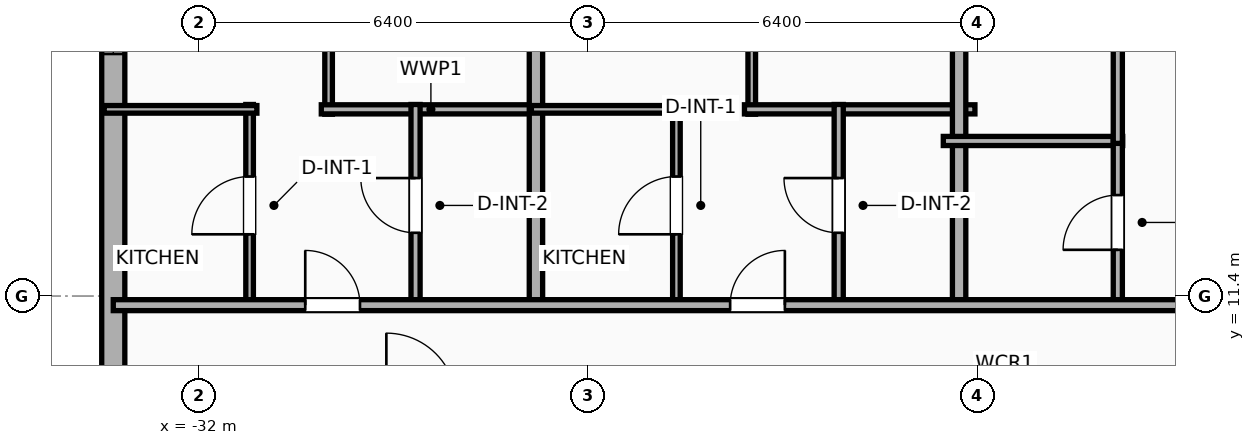
"""IFC4 building model, lengths in metres.
Left out: names, types, materials, properties, quantities, classifications, styles, units other than length and angle.
Written with IfcOpenShell. Run it as: python <this file> out.ifc"""

import sys

from ifc_helpers import new_model, si_unit, direction, frame, frame_2d, origin, place, context, subcontext, project, spatial, rectangle, extrude, element, fill, save


model = new_model("IFC4")
c1 = context("Model", 3, precision=1e-05, world=origin(), true_north=direction((0.0, 1.0)))
c2 = subcontext(c1, "Body", "Model", "MODEL_VIEW")
j1 = project(units=[si_unit("LENGTHUNIT", "METRE"), si_unit("PLANEANGLEUNIT", "RADIAN")], contexts=[c1])
p1 = place(None, origin())
s1 = spatial("IfcSite", under=j1, at=p1, CompositionType="ELEMENT")
p2 = place(p1, origin())
s2 = spatial("IfcBuilding", under=s1, at=p2, CompositionType="ELEMENT")
p3 = place(p2, frame((0.0, 0.0, 76.7)))
s3 = spatial("IfcBuildingStorey", under=s2, at=p3, CompositionType="ELEMENT", Elevation=76.7)
p4 = place(p3, frame((-33.41, -18.381, 0.0), z_axis=(0.0, 0.0, 1.0), x_axis=(0.0, 1.0, 0.0)))
e1 = element("IfcWall", 1, at=p4, inside=s3, PredefinedType="ELEMENTEDWALL", context=c2, shape_type="SweptSolid", body=[
    extrude(rectangle(XDim=36.763, YDim=0.38, at=frame_2d((18.381, 0.0))), origin(), (0.0, 0.0, 1.0), 3.6),
])
p5 = place(p4, frame((33.762, 0.0, 0.75)))
e2 = element("IfcOpeningElement", 2, at=p5, cuts=e1, PredefinedType="OPENING", context=c2, shape_type="SweptSolid", body=[
    extrude(rectangle(XDim=1.2, YDim=2.05, at=frame_2d((0.6, 1.025))), frame((0.0, 0.2, 0.0), z_axis=(0.0, -1.0, 0.0), x_axis=(1.0, 0.0, 0.0)), (0.0, 0.0, 1.0), 0.4),
])
p6 = place(p4, frame((22.701, 0.0, 0.75)))
e3 = element("IfcOpeningElement", 3, at=p6, cuts=e1, PredefinedType="OPENING", context=c2, shape_type="SweptSolid", body=[
    extrude(rectangle(XDim=1.2, YDim=2.05, at=frame_2d((0.6, 1.025))), frame((0.0, 0.2, 0.0), z_axis=(0.0, -1.0, 0.0), x_axis=(1.0, 0.0, 0.0)), (0.0, 0.0, 1.0), 0.4),
])
p7 = place(p4, frame((13.001, 0.0, 0.75)))
e4 = element("IfcOpeningElement", 4, at=p7, cuts=e1, PredefinedType="OPENING", context=c2, shape_type="SweptSolid", body=[
    extrude(rectangle(XDim=1.2, YDim=2.05, at=frame_2d((0.6, 1.025))), frame((0.0, 0.2, 0.0), z_axis=(0.0, -1.0, 0.0), x_axis=(1.0, 0.0, 0.0)), (0.0, 0.0, 1.0), 0.4),
])
p8 = place(p3, frame((-29.869, 14.39, 0.0), z_axis=(0.0, 0.0, 1.0), x_axis=(0.0, 1.0, 0.0)))
e5 = element("IfcWall", 5, at=p8, inside=s3, PredefinedType="PARTITIONING", context=c2, shape_type="SweptSolid", body=[
    extrude(rectangle(XDim=7.916, YDim=0.125, at=frame_2d((3.958, 0.0))), origin(), (0.0, 0.0, 1.0), 3.6),
])
p9 = place(p8, frame((1.45, 0.0, 0.0)))
e6 = element("IfcOpeningElement", 6, at=p9, cuts=e5, PredefinedType="OPENING", context=c2, shape_type="SweptSolid", body=[
    extrude(rectangle(XDim=0.9, YDim=2.05, at=frame_2d((0.45, 1.025))), frame((0.0, 0.073, 0.0), z_axis=(0.0, -1.0, 0.0), x_axis=(1.0, 0.0, 0.0)), (0.0, 0.0, 1.0), 0.145),
])
p10 = place(p3, frame((-29.989, 14.47, 0.0), z_axis=(0.0, 0.0, 1.0), x_axis=(1.0, 0.0, 0.0)))
e7 = element("IfcWall", 7, at=p10, inside=s3, PredefinedType="PLUMBINGWALL", context=c2, shape_type="SweptSolid", body=[
    extrude(rectangle(XDim=3.605, YDim=0.15, at=frame_2d((1.802, 0.0))), origin(), (0.0, 0.0, 1.0), 3.6),
])
p11 = place(p3, frame((-31.168, 11.23, 0.0), z_axis=(0.0, 0.0, 1.0), x_axis=(0.0, 1.0, 0.0)))
e8 = element("IfcWall", 8, at=p11, inside=s3, PredefinedType="PARTITIONING", context=c2, shape_type="SweptSolid", body=[
    extrude(rectangle(XDim=3.32, YDim=0.125, at=frame_2d((1.66, 0.0))), origin(), (0.0, 0.0, 1.0), 3.6),
])
p12 = place(p11, frame((1.185, 0.0, 0.0)))
e9 = element("IfcOpeningElement", 9, at=p12, cuts=e8, PredefinedType="OPENING", context=c2, shape_type="SweptSolid", body=[
    extrude(rectangle(XDim=0.95, YDim=2.05, at=frame_2d((0.475, 1.025))), frame((0.0, 0.073, 0.0), z_axis=(0.0, -1.0, 0.0), x_axis=(1.0, 0.0, 0.0)), (0.0, 0.0, 1.0), 0.145),
])
p13 = place(p3, frame((-33.56, 14.47, 0.0), z_axis=(0.0, 0.0, 1.0), x_axis=(1.0, 0.0, 0.0)))
e10 = element("IfcWall", 10, at=p13, inside=s3, PredefinedType="PARTITIONING", context=c2, shape_type="SweptSolid", body=[
    extrude(rectangle(XDim=2.512, YDim=0.125, at=frame_2d((1.256, 0.0))), origin(), (0.0, 0.0, 1.0), 3.6),
])
p14 = place(p3, frame((-28.439, 11.23, 0.0), z_axis=(0.0, 0.0, 1.0), x_axis=(0.0, 1.0, 0.0)))
e11 = element("IfcWall", 11, at=p14, inside=s3, PredefinedType="PLUMBINGWALL", context=c2, shape_type="SweptSolid", body=[
    extrude(rectangle(XDim=3.32, YDim=0.15, at=frame_2d((1.66, 0.0))), origin(), (0.0, 0.0, 1.0), 3.6),
])
p15 = place(p14, frame((1.21, 0.0, 0.0)))
e12 = element("IfcOpeningElement", 12, at=p15, cuts=e11, PredefinedType="OPENING", context=c2, shape_type="SweptSolid", body=[
    extrude(rectangle(XDim=0.9, YDim=2.05, at=frame_2d((0.45, 1.025))), frame((0.0, 0.085, 0.0), z_axis=(0.0, -1.0, 0.0), x_axis=(1.0, 0.0, 0.0)), (0.0, 0.0, 1.0), 0.17),
])
p16 = place(p3, frame((-26.459, 11.17, 0.0), z_axis=(0.0, 0.0, 1.0), x_axis=(0.0, 1.0, 0.0)))
e13 = element("IfcWall", 13, at=p16, inside=s3, PredefinedType="PARTITIONING", context=c2, shape_type="SweptSolid", body=[
    extrude(rectangle(XDim=11.04, YDim=0.22, at=frame_2d((5.52, 0.0))), origin(), (0.0, 0.0, 1.0), 3.6),
])
p17 = place(p3, frame((-22.91, 14.39, 0.0), z_axis=(0.0, 0.0, 1.0), x_axis=(0.0, 1.0, 0.0)))
e14 = element("IfcWall", 14, at=p17, inside=s3, PredefinedType="PARTITIONING", context=c2, shape_type="SweptSolid", body=[
    extrude(rectangle(XDim=7.97, YDim=0.125, at=frame_2d((3.985, 0.0))), origin(), (0.0, 0.0, 1.0), 3.6),
])
p18 = place(p17, frame((1.463, 0.0, 0.0)))
e15 = element("IfcOpeningElement", 15, at=p18, cuts=e14, PredefinedType="OPENING", context=c2, shape_type="SweptSolid", body=[
    extrude(rectangle(XDim=0.9, YDim=2.05, at=frame_2d((0.45, 1.025))), frame((0.0, 0.073, 0.0), z_axis=(0.0, -1.0, 0.0), x_axis=(1.0, 0.0, 0.0)), (0.0, 0.0, 1.0), 0.145),
])
p19 = place(p3, frame((-23.03, 14.47, 0.0), z_axis=(0.0, 0.0, 1.0), x_axis=(1.0, 0.0, 0.0)))
e16 = element("IfcWall", 16, at=p19, inside=s3, PredefinedType="PLUMBINGWALL", context=c2, shape_type="SweptSolid", body=[
    extrude(rectangle(XDim=3.79, YDim=0.15, at=frame_2d((1.895, 0.0))), origin(), (0.0, 0.0, 1.0), 3.6),
])
p20 = place(p3, frame((-24.149, 11.23, 0.0), z_axis=(0.0, 0.0, 1.0), x_axis=(0.0, 1.0, 0.0)))
e17 = element("IfcWall", 17, at=p20, inside=s3, PredefinedType="PARTITIONING", context=c2, shape_type="SweptSolid", body=[
    extrude(rectangle(XDim=3.32, YDim=0.125, at=frame_2d((1.66, 0.0))), origin(), (0.0, 0.0, 1.0), 3.6),
])
p21 = place(p20, frame((1.185, 0.0, 0.0)))
e18 = element("IfcOpeningElement", 18, at=p21, cuts=e17, PredefinedType="OPENING", context=c2, shape_type="SweptSolid", body=[
    extrude(rectangle(XDim=0.95, YDim=2.05, at=frame_2d((0.475, 1.025))), frame((0.0, 0.073, 0.0), z_axis=(0.0, -1.0, 0.0), x_axis=(1.0, 0.0, 0.0)), (0.0, 0.0, 1.0), 0.145),
])
p22 = place(p3, frame((-26.534, 14.47, 0.0), z_axis=(0.0, 0.0, 1.0), x_axis=(1.0, 0.0, 0.0)))
e19 = element("IfcWall", 19, at=p22, inside=s3, PredefinedType="PARTITIONING", context=c2, shape_type="SweptSolid", body=[
    extrude(rectangle(XDim=2.505, YDim=0.125, at=frame_2d((1.252, 0.0))), origin(), (0.0, 0.0, 1.0), 3.6),
])
p23 = place(p3, frame((-21.48, 11.23, 0.0), z_axis=(0.0, 0.0, 1.0), x_axis=(0.0, 1.0, 0.0)))
e20 = element("IfcWall", 20, at=p23, inside=s3, PredefinedType="PLUMBINGWALL", context=c2, shape_type="SweptSolid", body=[
    extrude(rectangle(XDim=3.32, YDim=0.15, at=frame_2d((1.66, 0.0))), origin(), (0.0, 0.0, 1.0), 3.6),
])
p24 = place(p23, frame((1.21, 0.0, 0.0)))
e21 = element("IfcOpeningElement", 21, at=p24, cuts=e20, PredefinedType="OPENING", context=c2, shape_type="SweptSolid", body=[
    extrude(rectangle(XDim=0.9, YDim=2.05, at=frame_2d((0.45, 1.025))), frame((0.0, 0.085, 0.0), z_axis=(0.0, -1.0, 0.0), x_axis=(1.0, 0.0, 0.0)), (0.0, 0.0, 1.0), 0.17),
])
p25 = place(p3, frame((-19.5, 11.17, 0.0), z_axis=(0.0, 0.0, 1.0), x_axis=(0.0, 1.0, 0.0)))
e22 = element("IfcWall", 22, at=p25, inside=s3, PredefinedType="PARTITIONING", context=c2, shape_type="SweptSolid", body=[
    extrude(rectangle(XDim=11.04, YDim=0.22, at=frame_2d((5.52, 0.0))), origin(), (0.0, 0.0, 1.0), 2.89),
])
p26 = place(p3, frame((-19.76, 13.95, 0.0), z_axis=(0.0, 0.0, 1.0), x_axis=(1.0, 0.0, 0.0)))
e23 = element("IfcWall", 23, at=p26, inside=s3, PredefinedType="PLUMBINGWALL", context=c2, shape_type="SweptSolid", body=[
    extrude(rectangle(XDim=2.95, YDim=0.15, at=frame_2d((1.475, 0.0))), origin(), (0.0, 0.0, 1.0), 3.6),
])
p27 = place(p3, frame((-16.89, 11.23, 0.0), z_axis=(0.0, 0.0, 1.0), x_axis=(0.0, 1.0, 0.0)))
e24 = element("IfcWall", 24, at=p27, inside=s3, PredefinedType="PLUMBINGWALL", context=c2, shape_type="SweptSolid", body=[
    extrude(rectangle(XDim=2.76, YDim=0.15, at=frame_2d((1.38, 0.0))), origin(), (0.0, 0.0, 1.0), 3.6),
])
p28 = place(p27, frame((0.93, 0.0, 0.0)))
e25 = element("IfcOpeningElement", 25, at=p28, cuts=e24, PredefinedType="OPENING", context=c2, shape_type="SweptSolid", body=[
    extrude(rectangle(XDim=0.9, YDim=2.05, at=frame_2d((0.45, 1.025))), frame((0.0, 0.085, 0.0), z_axis=(0.0, -1.0, 0.0), x_axis=(1.0, 0.0, 0.0)), (0.0, 0.0, 1.0), 0.17),
])
p29 = place(p3, frame((-16.89, 13.91, 0.0), z_axis=(0.0, 0.0, 1.0), x_axis=(0.0, 1.0, 0.0)))
e26 = element("IfcWall", 26, at=p29, inside=s3, PredefinedType="PLUMBINGWALL", context=c2, shape_type="SweptSolid", body=[
    extrude(rectangle(XDim=8.348, YDim=0.15, at=frame_2d((4.174, 0.0))), origin(), (0.0, 0.0, 1.0), 3.6),
])
p30 = place(p29, frame((3.724, 0.0, 0.0)))
e27 = element("IfcOpeningElement", 27, at=p30, cuts=e26, PredefinedType="OPENING", context=c2, shape_type="SweptSolid", body=[
    extrude(rectangle(XDim=0.9, YDim=2.05, at=frame_2d((0.45, 1.025))), frame((0.0, 0.085, 0.0), z_axis=(0.0, -1.0, 0.0), x_axis=(1.0, 0.0, 0.0)), (0.0, 0.0, 1.0), 0.17),
])
p31 = place(p3, frame((-33.41, 11.25, 0.0), z_axis=(0.0, 0.0, 1.0), x_axis=(1.0, 0.0, 0.0)))
e28 = element("IfcWall", 28, at=p31, inside=s3, PredefinedType="PARTITIONING", context=c2, shape_type="SweptSolid", body=[
    extrude(rectangle(XDim=59.62, YDim=0.18, at=frame_2d((29.81, 0.0))), origin(), (0.0, 0.0, 1.0), 3.6),
])
p32 = place(p31, frame((3.157, 0.0, 0.0)))
e29 = element("IfcOpeningElement", 29, at=p32, cuts=e28, PredefinedType="OPENING", context=c2, shape_type="SweptSolid", body=[
    extrude(rectangle(XDim=0.9, YDim=2.05, at=frame_2d((0.45, 1.025))), frame((0.0, 0.1, 0.0), z_axis=(0.0, -1.0, 0.0), x_axis=(1.0, 0.0, 0.0)), (0.0, 0.0, 1.0), 0.2),
])
p33 = place(p31, frame((10.145, 0.0, 0.0)))
e30 = element("IfcOpeningElement", 30, at=p33, cuts=e28, PredefinedType="OPENING", context=c2, shape_type="SweptSolid", body=[
    extrude(rectangle(XDim=0.9, YDim=2.05, at=frame_2d((0.45, 1.025))), frame((0.0, 0.1, 0.0), z_axis=(0.0, -1.0, 0.0), x_axis=(1.0, 0.0, 0.0)), (0.0, 0.0, 1.0), 0.2),
])
p34 = place(p31, frame((17.86, 0.0, 0.0)))
e31 = element("IfcOpeningElement", 31, at=p34, cuts=e28, PredefinedType="OPENING", context=c2, shape_type="SweptSolid", body=[
    extrude(rectangle(XDim=1.15, YDim=2.05, at=frame_2d((0.575, 1.025))), frame((0.0, 0.1, 0.0), z_axis=(0.0, -1.0, 0.0), x_axis=(1.0, 0.0, 0.0)), (0.0, 0.0, 1.0), 0.2),
])
p35 = place(p31, frame((23.338, 0.0, 0.0)))
e32 = element("IfcOpeningElement", 32, at=p35, cuts=e28, PredefinedType="OPENING", context=c2, shape_type="SweptSolid", body=[
    extrude(rectangle(XDim=0.9, YDim=2.05, at=frame_2d((0.45, 1.025))), frame((0.0, 0.1, 0.0), z_axis=(0.0, -1.0, 0.0), x_axis=(1.0, 0.0, 0.0)), (0.0, 0.0, 1.0), 0.2),
])
p36 = place(p31, frame((30.719, 0.0, 0.0)))
e33 = element("IfcOpeningElement", 33, at=p36, cuts=e28, PredefinedType="OPENING", context=c2, shape_type="SweptSolid", body=[
    extrude(rectangle(XDim=1.15, YDim=2.05, at=frame_2d((0.575, 1.025))), frame((0.0, 0.1, 0.0), z_axis=(0.0, -1.0, 0.0), x_axis=(1.0, 0.0, 0.0)), (0.0, 0.0, 1.0), 0.2),
])
p37 = place(p31, frame((34.81, 0.0, 0.0)))
e34 = element("IfcOpeningElement", 34, at=p37, cuts=e28, PredefinedType="OPENING", context=c2, shape_type="SweptSolid", body=[
    extrude(rectangle(XDim=1.15, YDim=2.05, at=frame_2d((0.575, 1.025))), frame((0.0, 0.1, 0.0), z_axis=(0.0, -1.0, 0.0), x_axis=(1.0, 0.0, 0.0)), (0.0, 0.0, 1.0), 0.2),
])
p38 = place(p31, frame((42.912, 0.0, 0.0)))
e35 = element("IfcOpeningElement", 35, at=p38, cuts=e28, PredefinedType="OPENING", context=c2, shape_type="SweptSolid", body=[
    extrude(rectangle(XDim=0.9, YDim=2.05, at=frame_2d((0.45, 1.025))), frame((0.0, 0.1, 0.0), z_axis=(0.0, -1.0, 0.0), x_axis=(1.0, 0.0, 0.0)), (0.0, 0.0, 1.0), 0.2),
])
p39 = place(p31, frame((49.482, 0.0, 0.0)))
e36 = element("IfcOpeningElement", 36, at=p39, cuts=e28, PredefinedType="OPENING", context=c2, shape_type="SweptSolid", body=[
    extrude(rectangle(XDim=0.9, YDim=2.05, at=frame_2d((0.45, 1.025))), frame((0.0, 0.1, 0.0), z_axis=(0.0, -1.0, 0.0), x_axis=(1.0, 0.0, 0.0)), (0.0, 0.0, 1.0), 0.2),
])
p40 = place(p31, frame((56.088, 0.0, 0.0)))
e37 = element("IfcOpeningElement", 37, at=p40, cuts=e28, PredefinedType="OPENING", context=c2, shape_type="SweptSolid", body=[
    extrude(rectangle(XDim=0.9, YDim=2.05, at=frame_2d((0.45, 1.025))), frame((0.0, 0.1, 0.0), z_axis=(0.0, -1.0, 0.0), x_axis=(1.0, 0.0, 0.0)), (0.0, 0.0, 1.0), 0.2),
])
p41 = place(p5, origin())
e38 = element("IfcWindow", 38, at=p41, inside=s3, PartitioningType="SINGLE_PANEL", PredefinedType="WINDOW", context=c2, shape_type="SweptSolid", body=[
    extrude(rectangle(XDim=1.2, YDim=2.05, at=frame_2d((0.6, 1.025))), frame((0.0, 0.03, 0.0), z_axis=(0.0, -1.0, 0.0), x_axis=(1.0, 0.0, 0.0)), (0.0, 0.0, 1.0), 0.06),
])
fill(e2, e38)
p42 = place(p12, origin())
e39 = element("IfcDoor", 39, at=p42, inside=s3, OperationType="SINGLE_SWING_LEFT", PredefinedType="DOOR", context=c2, shape_type="SweptSolid", body=[
    extrude(rectangle(XDim=0.95, YDim=2.05, at=frame_2d((0.475, 1.025))), frame((0.0, 0.025, 0.0), z_axis=(0.0, -1.0, 0.0), x_axis=(1.0, 0.0, 0.0)), (0.0, 0.0, 1.0), 0.05),
])
fill(e9, e39)
p43 = place(p15, origin())
e40 = element("IfcDoor", 40, at=p43, inside=s3, OperationType="SINGLE_SWING_RIGHT", PredefinedType="DOOR", context=c2, shape_type="SweptSolid", body=[
    extrude(rectangle(XDim=0.9, YDim=2.05, at=frame_2d((0.45, 1.025))), frame((0.0, 0.025, 0.0), z_axis=(0.0, -1.0, 0.0), x_axis=(1.0, 0.0, 0.0)), (0.0, 0.0, 1.0), 0.05),
])
fill(e12, e40)
p44 = place(p21, origin())
e41 = element("IfcDoor", 41, at=p44, inside=s3, OperationType="SINGLE_SWING_LEFT", PredefinedType="DOOR", context=c2, shape_type="SweptSolid", body=[
    extrude(rectangle(XDim=0.95, YDim=2.05, at=frame_2d((0.475, 1.025))), frame((0.0, 0.025, 0.0), z_axis=(0.0, -1.0, 0.0), x_axis=(1.0, 0.0, 0.0)), (0.0, 0.0, 1.0), 0.05),
])
fill(e18, e41)
p45 = place(p24, origin())
e42 = element("IfcDoor", 42, at=p45, inside=s3, OperationType="SINGLE_SWING_RIGHT", PredefinedType="DOOR", context=c2, shape_type="SweptSolid", body=[
    extrude(rectangle(XDim=0.9, YDim=2.05, at=frame_2d((0.45, 1.025))), frame((0.0, 0.025, 0.0), z_axis=(0.0, -1.0, 0.0), x_axis=(1.0, 0.0, 0.0)), (0.0, 0.0, 1.0), 0.05),
])
fill(e21, e42)
p46 = place(p28, origin())
e43 = element("IfcDoor", 43, at=p46, inside=s3, OperationType="SINGLE_SWING_LEFT", PredefinedType="DOOR", context=c2, shape_type="SweptSolid", body=[
    extrude(rectangle(XDim=0.9, YDim=2.05, at=frame_2d((0.45, 1.025))), frame((0.0, 0.025, 0.0), z_axis=(0.0, -1.0, 0.0), x_axis=(1.0, 0.0, 0.0)), (0.0, 0.0, 1.0), 0.05),
])
fill(e25, e43)
p47 = place(p32, origin())
e44 = element("IfcDoor", 44, at=p47, inside=s3, OperationType="SINGLE_SWING_LEFT", PredefinedType="DOOR", context=c2, shape_type="SweptSolid", body=[
    extrude(rectangle(XDim=0.9, YDim=2.05, at=frame_2d((0.45, 1.025))), frame((0.0, 0.025, 0.0), z_axis=(0.0, -1.0, 0.0), x_axis=(1.0, 0.0, 0.0)), (0.0, 0.0, 1.0), 0.05),
])
fill(e29, e44)
p48 = place(p33, origin())
e45 = element("IfcDoor", 45, at=p48, inside=s3, OperationType="SINGLE_SWING_RIGHT", PredefinedType="DOOR", context=c2, shape_type="SweptSolid", body=[
    extrude(rectangle(XDim=0.9, YDim=2.05, at=frame_2d((0.45, 1.025))), frame((0.0, 0.025, 0.0), z_axis=(0.0, -1.0, 0.0), x_axis=(1.0, 0.0, 0.0)), (0.0, 0.0, 1.0), 0.05),
])
fill(e30, e45)
save(model, sys.argv[1])
